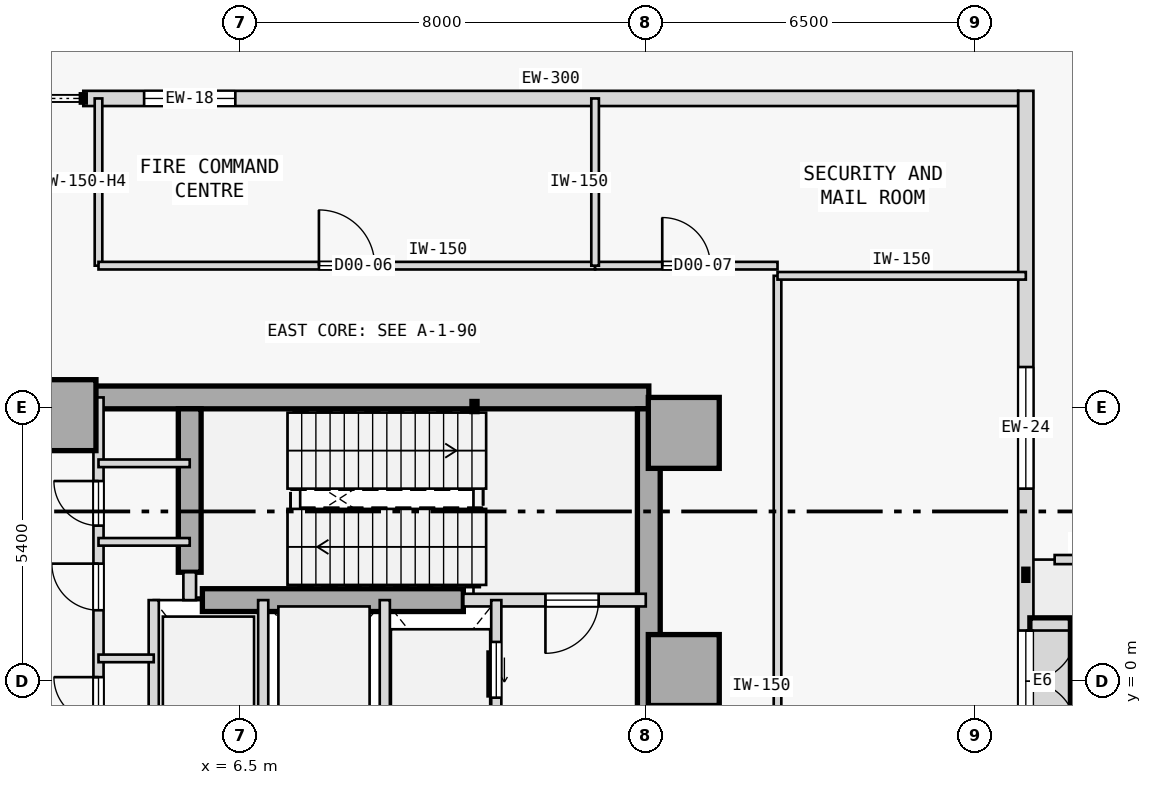
"""IFC4 building model, lengths in metres.
Left out: names, types, materials, properties, quantities, classifications, styles, units other than length and angle.
Written with IfcOpenShell. Run it as: python <this file> out.ifc"""

import sys

from ifc_helpers import new_model, si_unit, direction, frame, frame_2d, origin, origin_2d, place, context, subcontext, project, spatial, rectangle, hollow_rectangle, extrude, element, fill, save


model = new_model("IFC4")
c1 = context("Model", 3, precision=1e-05, world=origin(), true_north=direction((0.0, 1.0)))
c2 = subcontext(c1, "Body", "Model", "MODEL_VIEW")
j1 = project(units=[si_unit("LENGTHUNIT", "METRE"), si_unit("PLANEANGLEUNIT", "RADIAN")], contexts=[c1])
p1 = place(None, origin())
s1 = spatial("IfcSite", under=j1, at=p1, CompositionType="ELEMENT")
p2 = place(p1, origin())
s2 = spatial("IfcBuilding", under=s1, at=p2, CompositionType="ELEMENT")
p3 = place(p2, origin())
s3 = spatial("IfcBuildingStorey", under=s2, at=p3, CompositionType="ELEMENT", Elevation=0.0)
for number, where, z_axis, x_axis in (
    (1, (15.25, 4.9, 0.0), (0.0, 0.0, 1.0), (1.0, 0.0, 0.0)),
    (2, (15.25, 0.22, 0.0), (0.0, 0.0, 1.0), (1.0, 0.0, 0.0)),
    (3, (2.95, 5.25, 0.0), (0.0, 0.0, 1.0), (1.0, 0.0, 0.0)),
):
    element("IfcColumn", number, at=place(p3, frame(where, z_axis=z_axis, x_axis=x_axis)), inside=s3, PredefinedType="COLUMN", context=c2, shape_type="SweptSolid", body=[
        extrude(rectangle(XDim=1.4, YDim=1.4, at=origin_2d()), origin(), (0.0, 0.0, 1.0), 9.6),
    ])
p4 = place(p3, frame((3.15, 5.6, 0.0), z_axis=(0.0, 0.0, 1.0), x_axis=(1.0, 0.0, 0.0)))
e4 = element("IfcWall", 4, at=p4, inside=s3, PredefinedType="SHEAR", context=c2, shape_type="SweptSolid", body=[
    extrude(rectangle(XDim=11.41, YDim=0.45, at=frame_2d((5.705, 0.0))), origin(), (0.0, 0.0, 1.0), 9.2),
])
p5 = place(p3, frame((14.56, -5.375, 0.0), z_axis=(0.0, 0.0, 1.0), x_axis=(0.0, 1.0, 0.0)))
e5 = element("IfcWall", 5, at=p5, inside=s3, PredefinedType="SHEAR", context=c2, shape_type="SweptSolid", body=[
    extrude(rectangle(XDim=10.75, YDim=0.45, at=frame_2d((5.375, 0.0))), origin(), (0.0, 0.0, 1.0), 9.2),
])
p6 = place(p3, frame((5.5, 2.15, 0.0), z_axis=(0.0, 0.0, 1.0), x_axis=(0.0, 1.0, 0.0)))
e6 = element("IfcWall", 6, at=p6, inside=s3, PredefinedType="SHEAR", context=c2, shape_type="SweptSolid", body=[
    extrude(rectangle(XDim=3.225, YDim=0.45, at=frame_2d((1.613, 0.0))), origin(), (0.0, 0.0, 1.0), 9.2),
])
p7 = place(p3, frame((5.75, 1.6, 0.0), z_axis=(0.0, 0.0, 1.0), x_axis=(1.0, 0.0, 0.0)))
e7 = element("IfcWall", 7, at=p7, inside=s3, PredefinedType="SHEAR", context=c2, shape_type="SweptSolid", body=[
    extrude(rectangle(XDim=5.15, YDim=0.45, at=frame_2d((2.575, 0.0))), origin(), (0.0, 0.0, 1.0), 9.2),
])
p8 = place(p3, frame((11.12, 5.42, 0.0), z_axis=(0.0, 0.0, 1.0), x_axis=(1.0, 0.0, 0.0)))
e8 = element("IfcColumn", 8, at=p8, inside=s3, PredefinedType="COLUMN", context=c2, shape_type="SweptSolid", body=[
    extrude(hollow_rectangle(XDim=0.1, YDim=0.2, WallThickness=0.008, at=origin_2d()), origin(), (0.0, 0.0, 1.0), 9.6),
])
p9 = place(p3, frame((3.4, 11.5, 0.0), z_axis=(0.0, 0.0, 1.0), x_axis=(1.0, 0.0, 0.0)))
e9 = element("IfcWall", 9, at=p9, inside=s3, PredefinedType="STANDARD", context=c2, shape_type="SweptSolid", body=[
    extrude(rectangle(XDim=18.45, YDim=0.3, at=frame_2d((9.225, 0.0))), origin(), (0.0, 0.0, 1.0), 9.195),
])
p10 = place(p9, frame((1.2, 0.0, 1.1)))
e10 = element("IfcOpeningElement", 10, at=p10, cuts=e9, PredefinedType="OPENING", context=c2, shape_type="SweptSolid", body=[
    extrude(rectangle(XDim=1.8, YDim=2.1, at=frame_2d((0.9, 1.05))), frame((0.0, 0.16, 0.0), z_axis=(0.0, -1.0, 0.0), x_axis=(1.0, 0.0, 0.0)), (0.0, 0.0, 1.0), 0.32),
])
p11 = place(p3, frame((22.0, -11.65, 0.0), z_axis=(0.0, 0.0, 1.0), x_axis=(0.0, 1.0, 0.0)))
e11 = element("IfcWall", 11, at=p11, inside=s3, PredefinedType="STANDARD", context=c2, shape_type="SweptSolid", body=[
    extrude(rectangle(XDim=23.3, YDim=0.3, at=frame_2d((11.65, 0.0))), origin(), (0.0, 0.0, 1.0), 9.195),
])
p12 = place(p11, frame((10.65, 0.0, 0.0)))
e12 = element("IfcOpeningElement", 12, at=p12, cuts=e11, PredefinedType="OPENING", context=c2, shape_type="SweptSolid", body=[
    extrude(rectangle(XDim=2.0, YDim=2.4, at=frame_2d((1.0, 1.2))), frame((0.0, 0.16, 0.0), z_axis=(0.0, -1.0, 0.0), x_axis=(1.0, 0.0, 0.0)), (0.0, 0.0, 1.0), 0.32),
])
p13 = place(p11, frame((1.4, 0.0, 1.1)))
e13 = element("IfcOpeningElement", 13, at=p13, cuts=e11, PredefinedType="OPENING", context=c2, shape_type="SweptSolid", body=[
    extrude(rectangle(XDim=2.4, YDim=2.1, at=frame_2d((1.2, 1.05))), frame((0.0, 0.16, 0.0), z_axis=(0.0, -1.0, 0.0), x_axis=(1.0, 0.0, 0.0)), (0.0, 0.0, 1.0), 0.32),
])
p14 = place(p11, frame((15.45, 0.0, 1.1)))
e14 = element("IfcOpeningElement", 14, at=p14, cuts=e11, PredefinedType="OPENING", context=c2, shape_type="SweptSolid", body=[
    extrude(rectangle(XDim=2.4, YDim=2.1, at=frame_2d((1.2, 1.05))), frame((0.0, 0.16, 0.0), z_axis=(0.0, -1.0, 0.0), x_axis=(1.0, 0.0, 0.0)), (0.0, 0.0, 1.0), 0.32),
])
p15 = place(p3, frame((25.501, 2.4, 4.38), z_axis=(0.0, 0.0, 1.0), x_axis=(-1.0, 0.0, 0.0)))
e15 = element("IfcWall", 15, at=p15, inside=s3, PredefinedType="PARAPET", context=c2, shape_type="SweptSolid", body=[
    extrude(rectangle(XDim=2.932, YDim=0.18, at=frame_2d((1.466, 0.0))), origin(), (0.0, 0.0, 1.0), 0.65),
])
p16 = place(p3, frame((10.9, 1.6, 0.0), z_axis=(0.0, 0.0, 1.0), x_axis=(1.0, 0.0, 0.0)))
e16 = element("IfcWall", 16, at=p16, inside=s3, PredefinedType="STANDARD", context=c2, shape_type="SweptSolid", body=[
    extrude(rectangle(XDim=3.6, YDim=0.25, at=frame_2d((1.8, 0.0))), origin(), (0.0, 0.0, 1.0), 9.2),
])
p17 = place(p16, frame((1.62, 0.0, 0.0)))
e17 = element("IfcOpeningElement", 17, at=p17, cuts=e16, PredefinedType="OPENING", context=c2, shape_type="SweptSolid", body=[
    extrude(rectangle(XDim=1.05, YDim=2.15, at=frame_2d((0.525, 1.075))), frame((0.0, 0.135, 0.0), z_axis=(0.0, -1.0, 0.0), x_axis=(1.0, 0.0, 0.0)), (0.0, 0.0, 1.0), 0.27),
])
p18 = place(p3, frame((5.5, 1.6, 0.0), z_axis=(0.0, 0.0, 1.0), x_axis=(0.0, 1.0, 0.0)))
e18 = element("IfcWall", 18, at=p18, inside=s3, PredefinedType="STANDARD", context=c2, shape_type="SweptSolid", body=[
    extrude(rectangle(XDim=0.55, YDim=0.25, at=frame_2d((0.275, 0.0))), origin(), (0.0, 0.0, 1.0), 9.2),
])
p19 = place(p3, frame((3.7, -1.15, 0.0), z_axis=(0.0, 0.0, 1.0), x_axis=(0.0, 1.0, 0.0)))
e19 = element("IfcWall", 19, at=p19, inside=s3, PredefinedType="STANDARD", context=c2, shape_type="SweptSolid", body=[
    extrude(rectangle(XDim=6.75, YDim=0.2, at=frame_2d((3.375, 0.0))), origin(), (0.0, 0.0, 1.0), 9.2),
])
p20 = place(p19, frame((0.35, 0.0, 0.0)))
e20 = element("IfcOpeningElement", 20, at=p20, cuts=e19, PredefinedType="OPENING", context=c2, shape_type="SweptSolid", body=[
    extrude(rectangle(XDim=0.88, YDim=2.15, at=frame_2d((0.44, 1.075))), frame((0.0, 0.11, 0.0), z_axis=(0.0, -1.0, 0.0), x_axis=(1.0, 0.0, 0.0)), (0.0, 0.0, 1.0), 0.22),
])
p21 = place(p19, frame((2.55, 0.0, 0.0)))
e21 = element("IfcOpeningElement", 21, at=p21, cuts=e19, PredefinedType="OPENING", context=c2, shape_type="SweptSolid", body=[
    extrude(rectangle(XDim=0.92, YDim=2.15, at=frame_2d((0.46, 1.075))), frame((0.0, 0.11, 0.0), z_axis=(0.0, -1.0, 0.0), x_axis=(1.0, 0.0, 0.0)), (0.0, 0.0, 1.0), 0.22),
])
p22 = place(p19, frame((4.22, 0.0, 0.0)))
e22 = element("IfcOpeningElement", 22, at=p22, cuts=e19, PredefinedType="OPENING", context=c2, shape_type="SweptSolid", body=[
    extrude(rectangle(XDim=0.88, YDim=2.15, at=frame_2d((0.44, 1.075))), frame((0.0, 0.11, 0.0), z_axis=(0.0, -1.0, 0.0), x_axis=(1.0, 0.0, 0.0)), (0.0, 0.0, 1.0), 0.22),
])
p23 = place(p3, frame((11.55, -1.15, 0.0), z_axis=(0.0, 0.0, 1.0), x_axis=(0.0, 1.0, 0.0)))
e23 = element("IfcWall", 23, at=p23, inside=s3, PredefinedType="STANDARD", context=c2, shape_type="SweptSolid", body=[
    extrude(rectangle(XDim=2.75, YDim=0.2, at=frame_2d((1.375, 0.0))), origin(), (0.0, 0.0, 1.0), 9.2),
])
p24 = place(p23, frame((0.825, 0.0, 0.0)))
e24 = element("IfcOpeningElement", 24, at=p24, cuts=e23, PredefinedType="OPENING", context=c2, shape_type="SweptSolid", body=[
    extrude(rectangle(XDim=1.1, YDim=2.15, at=frame_2d((0.55, 1.075))), frame((0.0, 0.11, 0.0), z_axis=(0.0, -1.0, 0.0), x_axis=(1.0, 0.0, 0.0)), (0.0, 0.0, 1.0), 0.22),
])
for number, where, z_axis, x_axis in (
    (25, (9.35, -1.15, 0.0), (0.0, 0.0, 1.0), (0.0, 1.0, 0.0)),
    (26, (6.95, -1.15, 0.0), (0.0, 0.0, 1.0), (0.0, 1.0, 0.0)),
    (27, (4.79, -1.15, 0.0), (0.0, 0.0, 1.0), (0.0, 1.0, 0.0)),
):
    element("IfcWall", number, at=place(p3, frame(where, z_axis=z_axis, x_axis=x_axis)), inside=s3, PredefinedType="STANDARD", context=c2, shape_type="SweptSolid", body=[
        extrude(rectangle(XDim=2.75, YDim=0.2, at=frame_2d((1.375, 0.0))), origin(), (0.0, 0.0, 1.0), 9.2),
    ])
p25 = place(p3, frame((3.7, 4.3, 0.0), z_axis=(0.0, 0.0, 1.0), x_axis=(1.0, 0.0, 0.0)))
e28 = element("IfcWall", 28, at=p25, inside=s3, PredefinedType="PARTITIONING", context=c2, shape_type="SweptSolid", body=[
    extrude(rectangle(XDim=1.8, YDim=0.15, at=frame_2d((0.9, 0.0))), origin(), (0.0, 0.0, 1.0), 9.2),
])
p26 = place(p3, frame((3.7, 0.45, 0.0), z_axis=(0.0, 0.0, 1.0), x_axis=(1.0, 0.0, 0.0)))
e29 = element("IfcWall", 29, at=p26, inside=s3, PredefinedType="PARTITIONING", context=c2, shape_type="SweptSolid", body=[
    extrude(rectangle(XDim=1.09, YDim=0.15, at=frame_2d((0.545, 0.0))), origin(), (0.0, 0.0, 1.0), 9.2),
])
p27 = place(p3, frame((3.7, 2.75, 0.0), z_axis=(0.0, 0.0, 1.0), x_axis=(1.0, 0.0, 0.0)))
e30 = element("IfcWall", 30, at=p27, inside=s3, PredefinedType="PARTITIONING", context=c2, shape_type="SweptSolid", body=[
    extrude(rectangle(XDim=1.8, YDim=0.15, at=frame_2d((0.9, 0.0))), origin(), (0.0, 0.0, 1.0), 9.2),
])
p28 = place(p3, frame((3.7, 8.2, 0.0), z_axis=(0.0, 0.0, 1.0), x_axis=(0.0, 1.0, 0.0)))
e31 = element("IfcWall", 31, at=p28, inside=s3, PredefinedType="PARTITIONING", context=c2, shape_type="SweptSolid", body=[
    extrude(rectangle(XDim=3.3, YDim=0.15, at=frame_2d((1.65, 0.0))), origin(), (0.0, 0.0, 1.0), 8.14),
])
p29 = place(p3, frame((3.7, 8.2, 0.0), z_axis=(0.0, 0.0, 1.0), x_axis=(1.0, 0.0, 0.0)))
e32 = element("IfcWall", 32, at=p29, inside=s3, PredefinedType="PARTITIONING", context=c2, shape_type="SweptSolid", body=[
    extrude(rectangle(XDim=9.8, YDim=0.15, at=frame_2d((4.9, 0.0))), origin(), (0.0, 0.0, 1.0), 9.2),
])
p30 = place(p29, frame((4.35, 0.0, 0.0)))
e33 = element("IfcOpeningElement", 33, at=p30, cuts=e32, PredefinedType="OPENING", context=c2, shape_type="SweptSolid", body=[
    extrude(rectangle(XDim=1.1, YDim=2.15, at=frame_2d((0.55, 1.075))), frame((0.0, 0.085, 0.0), z_axis=(0.0, -1.0, 0.0), x_axis=(1.0, 0.0, 0.0)), (0.0, 0.0, 1.0), 0.17),
])
p31 = place(p3, frame((13.5, 8.2, 0.0), z_axis=(0.0, 0.0, 1.0), x_axis=(1.0, 0.0, 0.0)))
e34 = element("IfcWall", 34, at=p31, inside=s3, PredefinedType="PARTITIONING", context=c2, shape_type="SweptSolid", body=[
    extrude(rectangle(XDim=3.6, YDim=0.15, at=frame_2d((1.8, 0.0))), origin(), (0.0, 0.0, 1.0), 9.2),
])
p32 = place(p31, frame((1.325, 0.0, 0.0)))
e35 = element("IfcOpeningElement", 35, at=p32, cuts=e34, PredefinedType="OPENING", context=c2, shape_type="SweptSolid", body=[
    extrude(rectangle(XDim=0.95, YDim=2.15, at=frame_2d((0.475, 1.075))), frame((0.0, 0.085, 0.0), z_axis=(0.0, -1.0, 0.0), x_axis=(1.0, 0.0, 0.0)), (0.0, 0.0, 1.0), 0.17),
])
p33 = place(p3, frame((17.1, -8.2, 0.0), z_axis=(0.0, 0.0, 1.0), x_axis=(0.0, 1.0, 0.0)))
e36 = element("IfcWall", 36, at=p33, inside=s3, PredefinedType="PARTITIONING", context=c2, shape_type="SweptSolid", body=[
    extrude(rectangle(XDim=16.2, YDim=0.15, at=frame_2d((8.1, 0.0))), origin(), (0.0, 0.0, 1.0), 9.2),
])
p34 = place(p33, frame((4.92, 0.0, 0.0)))
e37 = element("IfcOpeningElement", 37, at=p34, cuts=e36, PredefinedType="OPENING", context=c2, shape_type="SweptSolid", body=[
    extrude(rectangle(XDim=1.5, YDim=2.15, at=frame_2d((0.75, 1.075))), frame((0.0, 0.085, 0.0), z_axis=(0.0, -1.0, 0.0), x_axis=(1.0, 0.0, 0.0)), (0.0, 0.0, 1.0), 0.17),
])
p35 = place(p3, frame((13.5, 8.2, 0.0), z_axis=(0.0, 0.0, 1.0), x_axis=(0.0, 1.0, 0.0)))
e38 = element("IfcWall", 38, at=p35, inside=s3, PredefinedType="PARTITIONING", context=c2, shape_type="SweptSolid", body=[
    extrude(rectangle(XDim=3.3, YDim=0.15, at=frame_2d((1.65, 0.0))), origin(), (0.0, 0.0, 1.0), 9.2),
])
p36 = place(p3, frame((17.1, 8.0, 0.0), z_axis=(0.0, 0.0, 1.0), x_axis=(1.0, 0.0, 0.0)))
e39 = element("IfcWall", 39, at=p36, inside=s3, PredefinedType="PARTITIONING", context=c2, shape_type="SweptSolid", body=[
    extrude(rectangle(XDim=4.9, YDim=0.15, at=frame_2d((2.45, 0.0))), origin(), (0.0, 0.0, 1.0), 9.2),
])
p37 = place(p10, origin())
e40 = element("IfcWindow", 40, at=p37, inside=s3, PartitioningType="SINGLE_PANEL", PredefinedType="WINDOW", context=c2, shape_type="SweptSolid", body=[
    extrude(rectangle(XDim=1.8, YDim=2.1, at=frame_2d((0.9, 1.05))), frame((0.0, 0.03, 0.0), z_axis=(0.0, -1.0, 0.0), x_axis=(1.0, 0.0, 0.0)), (0.0, 0.0, 1.0), 0.06),
])
fill(e10, e40)
p38 = place(p12, frame((2.0, 0.0, 0.0), z_axis=(0.0, 0.0, 1.0), x_axis=(-1.0, 0.0, 0.0)))
e41 = element("IfcDoor", 41, at=p38, inside=s3, OperationType="DOUBLE_DOOR_SINGLE_SWING", PredefinedType="DOOR", context=c2, shape_type="SweptSolid", body=[
    extrude(rectangle(XDim=2.0, YDim=2.4, at=frame_2d((1.0, 1.2))), frame((0.0, 0.025, 0.0), z_axis=(0.0, -1.0, 0.0), x_axis=(1.0, 0.0, 0.0)), (0.0, 0.0, 1.0), 0.05),
])
fill(e12, e41)
p39 = place(p14, origin())
e42 = element("IfcWindow", 42, at=p39, inside=s3, PartitioningType="SINGLE_PANEL", PredefinedType="WINDOW", context=c2, shape_type="SweptSolid", body=[
    extrude(rectangle(XDim=2.4, YDim=2.1, at=frame_2d((1.2, 1.05))), frame((0.0, 0.03, 0.0), z_axis=(0.0, -1.0, 0.0), x_axis=(1.0, 0.0, 0.0)), (0.0, 0.0, 1.0), 0.06),
])
fill(e14, e42)
p40 = place(p17, frame((1.05, 0.0, 0.0), z_axis=(0.0, 0.0, 1.0), x_axis=(-1.0, 0.0, 0.0)))
e43 = element("IfcDoor", 43, at=p40, inside=s3, OperationType="SINGLE_SWING_LEFT", PredefinedType="DOOR", context=c2, shape_type="SweptSolid", body=[
    extrude(rectangle(XDim=1.05, YDim=2.15, at=frame_2d((0.525, 1.075))), frame((0.0, 0.025, 0.0), z_axis=(0.0, -1.0, 0.0), x_axis=(1.0, 0.0, 0.0)), (0.0, 0.0, 1.0), 0.05),
])
fill(e17, e43)
p41 = place(p24, origin())
e44 = element("IfcDoor", 44, at=p41, inside=s3, OperationType="SLIDING_TO_RIGHT", PredefinedType="DOOR", context=c2, shape_type="SweptSolid", body=[
    extrude(rectangle(XDim=1.1, YDim=2.15, at=frame_2d((0.55, 1.075))), frame((0.0, 0.025, 0.0), z_axis=(0.0, -1.0, 0.0), x_axis=(1.0, 0.0, 0.0)), (0.0, 0.0, 1.0), 0.05),
])
fill(e24, e44)
p42 = place(p20, origin())
e45 = element("IfcDoor", 45, at=p42, inside=s3, OperationType="SINGLE_SWING_RIGHT", PredefinedType="DOOR", context=c2, shape_type="SweptSolid", body=[
    extrude(rectangle(XDim=0.88, YDim=2.15, at=frame_2d((0.44, 1.075))), frame((0.0, 0.025, 0.0), z_axis=(0.0, -1.0, 0.0), x_axis=(1.0, 0.0, 0.0)), (0.0, 0.0, 1.0), 0.05),
])
fill(e20, e45)
p43 = place(p21, origin())
e46 = element("IfcDoor", 46, at=p43, inside=s3, OperationType="SINGLE_SWING_RIGHT", PredefinedType="DOOR", context=c2, shape_type="SweptSolid", body=[
    extrude(rectangle(XDim=0.92, YDim=2.15, at=frame_2d((0.46, 1.075))), frame((0.0, 0.025, 0.0), z_axis=(0.0, -1.0, 0.0), x_axis=(1.0, 0.0, 0.0)), (0.0, 0.0, 1.0), 0.05),
])
fill(e21, e46)
p44 = place(p22, origin())
e47 = element("IfcDoor", 47, at=p44, inside=s3, OperationType="SINGLE_SWING_RIGHT", PredefinedType="DOOR", context=c2, shape_type="SweptSolid", body=[
    extrude(rectangle(XDim=0.88, YDim=2.15, at=frame_2d((0.44, 1.075))), frame((0.0, 0.025, 0.0), z_axis=(0.0, -1.0, 0.0), x_axis=(1.0, 0.0, 0.0)), (0.0, 0.0, 1.0), 0.05),
])
fill(e22, e47)
p45 = place(p30, origin())
e48 = element("IfcDoor", 48, at=p45, inside=s3, OperationType="SINGLE_SWING_LEFT", PredefinedType="DOOR", context=c2, shape_type="SweptSolid", body=[
    extrude(rectangle(XDim=1.1, YDim=2.15, at=frame_2d((0.55, 1.075))), frame((0.0, 0.025, 0.0), z_axis=(0.0, -1.0, 0.0), x_axis=(1.0, 0.0, 0.0)), (0.0, 0.0, 1.0), 0.05),
])
fill(e33, e48)
p46 = place(p32, origin())
e49 = element("IfcDoor", 49, at=p46, inside=s3, OperationType="SINGLE_SWING_LEFT", PredefinedType="DOOR", context=c2, shape_type="SweptSolid", body=[
    extrude(rectangle(XDim=0.95, YDim=2.15, at=frame_2d((0.475, 1.075))), frame((0.0, 0.025, 0.0), z_axis=(0.0, -1.0, 0.0), x_axis=(1.0, 0.0, 0.0)), (0.0, 0.0, 1.0), 0.05),
])
fill(e35, e49)
save(model, sys.argv[1])
